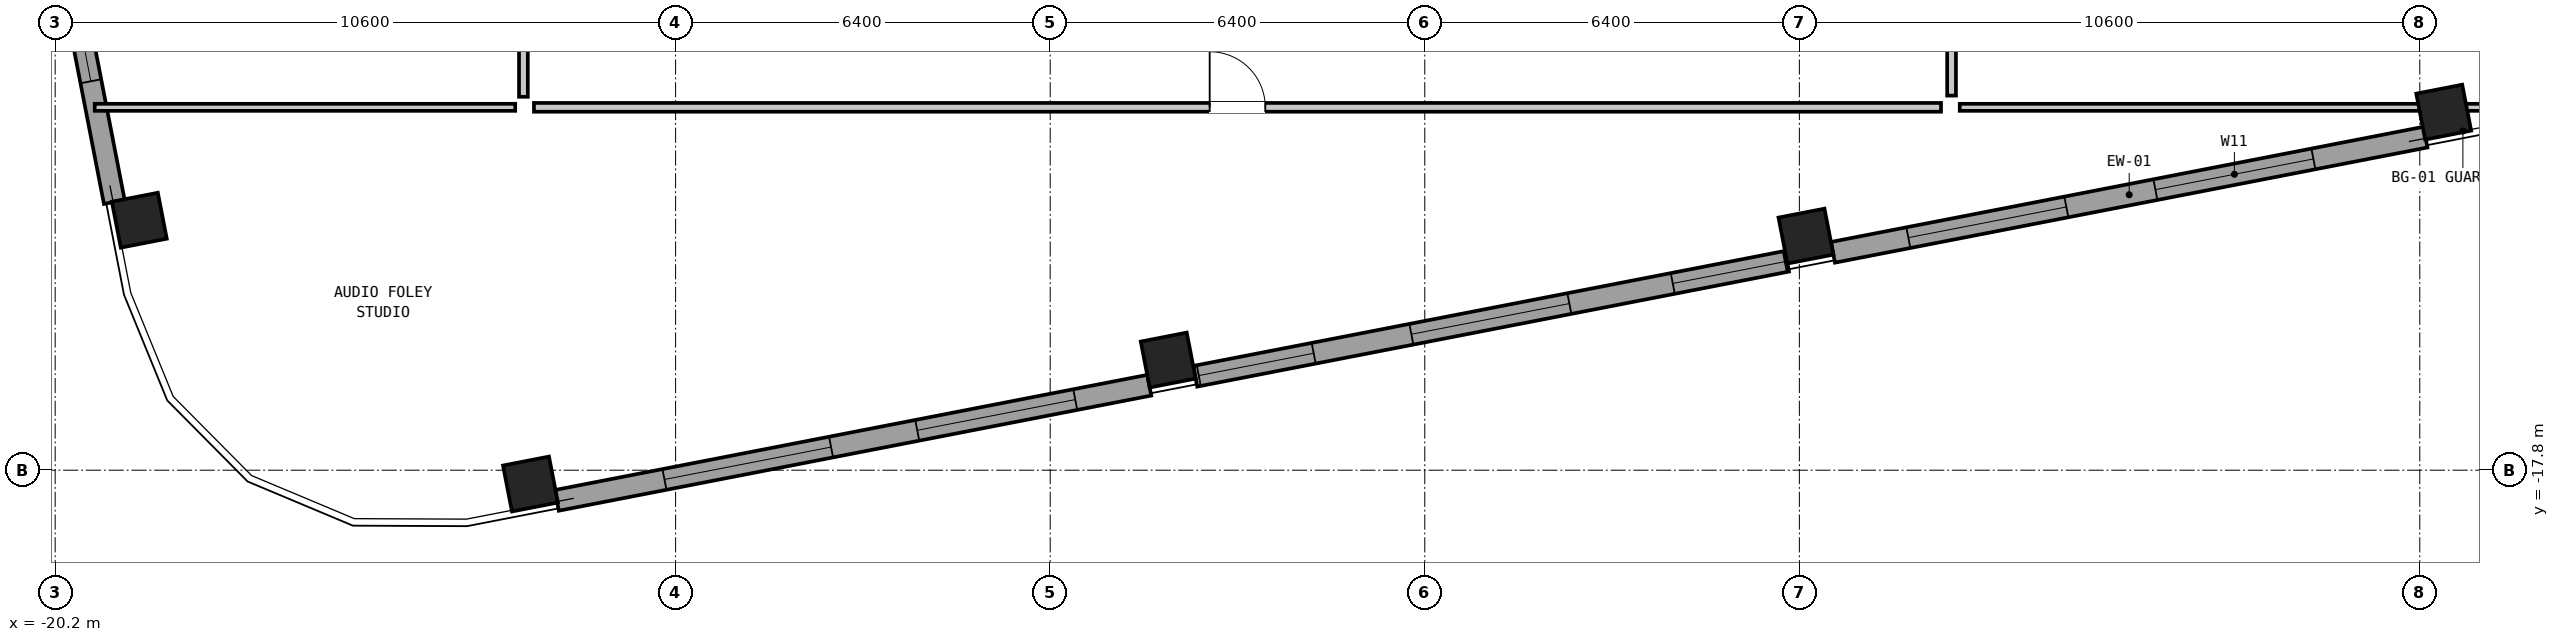
"""IFC4 building model, lengths in metres.
Left out: names, types, materials, properties, quantities, classifications, styles, units other than length and angle.
Written with IfcOpenShell. Run it as: python <this file> out.ifc"""

import sys

from ifc_helpers import new_model, si_unit, direction, frame, frame_2d, origin, origin_2d, place, context, subcontext, project, spatial, rectangle, hollow_rectangle, extrude, element, fill, save


model = new_model("IFC4")
c1 = context("Model", 3, precision=1e-05, world=origin(), true_north=direction((0.0, 1.0)))
c2 = subcontext(c1, "Body", "Model", "MODEL_VIEW")
j1 = project(units=[si_unit("LENGTHUNIT", "METRE"), si_unit("PLANEANGLEUNIT", "RADIAN")], contexts=[c1])
p1 = place(None, origin())
s1 = spatial("IfcSite", under=j1, at=p1, CompositionType="ELEMENT")
p2 = place(p1, origin())
s2 = spatial("IfcBuilding", under=s1, at=p2, CompositionType="ELEMENT")
p3 = place(p2, frame((0.0, 0.0, 115.85)))
s3 = spatial("IfcBuildingStorey", under=s2, at=p3, CompositionType="ELEMENT", Elevation=115.85)
for number, where, z_axis, x_axis in (
    (1, (-12.08, -18.036, 0.0), (0.0, 0.0, 1.0), (0.982, 0.191, 0.0)),
    (2, (-1.183, -15.918, 0.0), (0.0, 0.0, 1.0), (0.982, 0.191, 0.0)),
    (3, (9.713, -13.8, 0.0), (0.0, 0.0, 1.0), (0.982, 0.191, 0.0)),
    (4, (20.609, -11.682, 0.0), (0.0, 0.0, 1.0), (0.982, 0.191, 0.0)),
    (5, (-18.762, -13.529, 0.0), (0.0, 0.0, 1.0), (-0.191, 0.982, 0.0)),
):
    element("IfcColumn", number, at=place(p3, frame(where, z_axis=z_axis, x_axis=x_axis)), inside=s3, PredefinedType="COLUMN", context=c2, shape_type="SweptSolid", body=[
        extrude(hollow_rectangle(XDim=0.8, YDim=0.8, WallThickness=0.05, at=origin_2d()), origin(), (0.0, 0.0, 1.0), 3.05),
    ])
p4 = place(p3, frame((20.296, -12.11, 0.0), z_axis=(0.0, 0.0, 1.0), x_axis=(-0.981628941133, -0.190799952646, 0.0)))
e6 = element("IfcWall", 6, at=p4, inside=s3, PredefinedType="SOLIDWALL", context=c2, shape_type="SweptSolid", body=[
    extrude(rectangle(XDim=10.312, YDim=0.36, at=frame_2d((5.156, 0.0))), origin(), (0.0, 0.0, 1.0), 2.067),
])
p5 = place(p4, frame((1.95, 0.0, 0.2)))
e7 = element("IfcOpeningElement", 7, at=p5, cuts=e6, PredefinedType="OPENING", context=c2, shape_type="SweptSolid", body=[
    extrude(rectangle(XDim=2.75, YDim=0.95, at=frame_2d((1.375, 0.475))), frame((0.0, 0.192, 0.0), z_axis=(0.0, -1.0, 0.0), x_axis=(1.0, 0.0, 0.0)), (0.0, 0.0, 1.0), 0.384),
])
p6 = place(p4, frame((6.25, 0.0, 0.95)))
e8 = element("IfcOpeningElement", 8, at=p6, cuts=e6, PredefinedType="OPENING", context=c2, shape_type="SweptSolid", body=[
    extrude(rectangle(XDim=2.75, YDim=0.95, at=frame_2d((1.375, 0.475))), frame((0.0, 0.192, 0.0), z_axis=(0.0, -1.0, 0.0), x_axis=(1.0, 0.0, 0.0)), (0.0, 0.0, 1.0), 0.384),
])
p7 = place(p3, frame((9.389, -14.23, 0.0), z_axis=(0.0, 0.0, 1.0), x_axis=(-0.981627477005, -0.190807485147, 0.0)))
e9 = element("IfcWall", 9, at=p7, inside=s3, PredefinedType="SOLIDWALL", context=c2, shape_type="SweptSolid", body=[
    extrude(rectangle(XDim=10.3, YDim=0.36, at=frame_2d((5.15, 0.0))), origin(), (0.0, 0.0, 1.0), 2.067),
])
p8 = place(p7, frame((0.038, 0.0, 0.2)))
e10 = element("IfcOpeningElement", 10, at=p8, cuts=e9, PredefinedType="OPENING", context=c2, shape_type="SweptSolid", body=[
    extrude(rectangle(XDim=1.95, YDim=1.1, at=frame_2d((0.975, 0.55))), frame((0.0, 0.192, 0.0), z_axis=(0.0, -1.0, 0.0), x_axis=(1.0, 0.0, 0.0)), (0.0, 0.0, 1.0), 0.384),
])
p9 = place(p7, frame((3.788, 0.0, 0.95)))
e11 = element("IfcOpeningElement", 11, at=p9, cuts=e9, PredefinedType="OPENING", context=c2, shape_type="SweptSolid", body=[
    extrude(rectangle(XDim=2.75, YDim=0.95, at=frame_2d((1.375, 0.475))), frame((0.0, 0.192, 0.0), z_axis=(0.0, -1.0, 0.0), x_axis=(1.0, 0.0, 0.0)), (0.0, 0.0, 1.0), 0.384),
])
p10 = place(p7, frame((8.238, 0.0, 0.2)))
e12 = element("IfcOpeningElement", 12, at=p10, cuts=e9, PredefinedType="OPENING", context=c2, shape_type="SweptSolid", body=[
    extrude(rectangle(XDim=2.0, YDim=1.05, at=frame_2d((1.0, 0.525))), frame((0.0, 0.192, 0.0), z_axis=(0.0, -1.0, 0.0), x_axis=(1.0, 0.0, 0.0)), (0.0, 0.0, 1.0), 0.384),
])
p11 = place(p3, frame((-1.507, -16.348, 0.0), z_axis=(0.0, 0.0, 1.0), x_axis=(-0.981628941133, -0.190799952646, 0.0)))
e13 = element("IfcWall", 13, at=p11, inside=s3, PredefinedType="SOLIDWALL", context=c2, shape_type="SweptSolid", body=[
    extrude(rectangle(XDim=10.312, YDim=0.36, at=frame_2d((5.156, 0.0))), origin(), (0.0, 0.0, 1.0), 2.067),
])
p12 = place(p11, frame((1.288, 0.0, 0.95)))
e14 = element("IfcOpeningElement", 14, at=p12, cuts=e13, PredefinedType="OPENING", context=c2, shape_type="SweptSolid", body=[
    extrude(rectangle(XDim=2.75, YDim=0.95, at=frame_2d((1.375, 0.475))), frame((0.0, 0.192, 0.0), z_axis=(0.0, -1.0, 0.0), x_axis=(1.0, 0.0, 0.0)), (0.0, 0.0, 1.0), 0.384),
])
p13 = place(p11, frame((5.538, 0.0, 0.2)))
e15 = element("IfcOpeningElement", 15, at=p13, cuts=e13, PredefinedType="OPENING", context=c2, shape_type="SweptSolid", body=[
    extrude(rectangle(XDim=2.9, YDim=0.9, at=frame_2d((1.45, 0.45))), frame((0.0, 0.192, 0.0), z_axis=(0.0, -1.0, 0.0), x_axis=(1.0, 0.0, 0.0)), (0.0, 0.0, 1.0), 0.384),
])
p14 = place(p3, frame((-19.19, -13.217, 0.0), z_axis=(0.0, 0.0, 1.0), x_axis=(-0.190822765986, 0.981624506612, 0.0)))
e16 = element("IfcWall", 16, at=p14, inside=s3, PredefinedType="SOLIDWALL", context=c2, shape_type="SweptSolid", body=[
    extrude(rectangle(XDim=10.312, YDim=0.36, at=frame_2d((5.156, 0.0))), origin(), (0.0, 0.0, 1.0), 2.067),
])
p15 = place(p14, frame((2.1, 0.0, 0.2)))
e17 = element("IfcOpeningElement", 17, at=p15, cuts=e16, PredefinedType="OPENING", context=c2, shape_type="SweptSolid", body=[
    extrude(rectangle(XDim=2.45, YDim=1.1, at=frame_2d((1.225, 0.55))), frame((0.0, 0.192, 0.0), z_axis=(0.0, -1.0, 0.0), x_axis=(1.0, 0.0, 0.0)), (0.0, 0.0, 1.0), 0.384),
])
p16 = place(p14, frame((6.15, 0.0, 0.95)))
e18 = element("IfcOpeningElement", 18, at=p16, cuts=e16, PredefinedType="OPENING", context=c2, shape_type="SweptSolid", body=[
    extrude(rectangle(XDim=2.95, YDim=0.95, at=frame_2d((1.475, 0.475))), frame((0.0, 0.192, 0.0), z_axis=(0.0, -1.0, 0.0), x_axis=(1.0, 0.0, 0.0)), (0.0, 0.0, 1.0), 0.384),
])
p17 = place(p3, frame((-19.524, -11.6, 0.0), z_axis=(0.0, 0.0, 1.0), x_axis=(1.0, 0.0, 0.0)))
e19 = element("IfcWall", 19, at=p17, inside=s3, PredefinedType="PARTITIONING", context=c2, shape_type="SweptSolid", body=[
    extrude(rectangle(XDim=7.184, YDim=0.12, at=frame_2d((3.592, 0.0))), origin(), (0.0, 0.0, 1.0), 2.347),
])
p18 = place(p3, frame((12.34, -11.6, 0.0), z_axis=(0.0, 0.0, 1.0), x_axis=(1.0, 0.0, 0.0)))
e20 = element("IfcWall", 20, at=p18, inside=s3, PredefinedType="PARTITIONING", context=c2, shape_type="SweptSolid", body=[
    extrude(rectangle(XDim=10.066, YDim=0.12, at=frame_2d((5.033, 0.0))), origin(), (0.0, 0.0, 1.0), 2.127),
])
p19 = place(p3, frame((-12.02, -11.6, 0.0), z_axis=(0.0, 0.0, 1.0), x_axis=(1.0, 0.0, 0.0)))
e21 = element("IfcWall", 21, at=p19, inside=s3, PredefinedType="PARTITIONING", context=c2, shape_type="SweptSolid", body=[
    extrude(rectangle(XDim=24.04, YDim=0.15, at=frame_2d((12.02, 0.0))), origin(), (0.0, 0.0, 1.0), 2.347),
])
p20 = place(p19, frame((11.545, 0.0, 0.0)))
e22 = element("IfcOpeningElement", 22, at=p20, cuts=e21, PredefinedType="OPENING", context=c2, shape_type="SweptSolid", body=[
    extrude(rectangle(XDim=0.95, YDim=2.1, at=frame_2d((0.475, 1.05))), frame((0.0, 0.087, 0.0), z_axis=(0.0, -1.0, 0.0), x_axis=(1.0, 0.0, 0.0)), (0.0, 0.0, 1.0), 0.174),
])
p21 = place(p3, frame((-12.2, -11.42, 0.0), z_axis=(0.0, 0.0, 1.0), x_axis=(0.0, 1.0, 0.0)))
e23 = element("IfcWall", 23, at=p21, inside=s3, PredefinedType="PARTITIONING", context=c2, shape_type="SweptSolid", body=[
    extrude(rectangle(XDim=24.04, YDim=0.15, at=frame_2d((12.02, 0.0))), origin(), (0.0, 0.0, 1.0), 2.83),
])
p22 = place(p21, frame((11.545, 0.0, 0.0)))
e24 = element("IfcOpeningElement", 24, at=p22, cuts=e23, PredefinedType="OPENING", context=c2, shape_type="SweptSolid", body=[
    extrude(rectangle(XDim=0.95, YDim=2.1, at=frame_2d((0.475, 1.05))), frame((0.0, 0.087, 0.0), z_axis=(0.0, -1.0, 0.0), x_axis=(1.0, 0.0, 0.0)), (0.0, 0.0, 1.0), 0.174),
])
p23 = place(p3, frame((12.2, -11.4, 0.0), z_axis=(0.0, 0.0, 1.0), x_axis=(0.0, 1.0, 0.0)))
e25 = element("IfcWall", 25, at=p23, inside=s3, PredefinedType="PARTITIONING", context=c2, shape_type="SweptSolid", body=[
    extrude(rectangle(XDim=8.84, YDim=0.15, at=frame_2d((4.42, 0.0))), origin(), (0.0, 0.0, 1.0), 2.83),
])
p24 = place(p23, frame((3.945, 0.0, 0.0)))
e26 = element("IfcOpeningElement", 26, at=p24, cuts=e25, PredefinedType="OPENING", context=c2, shape_type="SweptSolid", body=[
    extrude(rectangle(XDim=0.95, YDim=2.1, at=frame_2d((0.475, 1.05))), frame((0.0, 0.087, 0.0), z_axis=(0.0, -1.0, 0.0), x_axis=(1.0, 0.0, 0.0)), (0.0, 0.0, 1.0), 0.174),
])
p25 = place(p5, origin())
e27 = element("IfcWindow", 27, at=p25, inside=s3, PartitioningType="SINGLE_PANEL", PredefinedType="WINDOW", context=c2, shape_type="SweptSolid", body=[
    extrude(rectangle(XDim=2.75, YDim=0.95, at=frame_2d((1.375, 0.475))), frame((0.0, 0.03, 0.0), z_axis=(0.0, -1.0, 0.0), x_axis=(1.0, 0.0, 0.0)), (0.0, 0.0, 1.0), 0.06),
])
fill(e7, e27)
p26 = place(p6, origin())
e28 = element("IfcWindow", 28, at=p26, inside=s3, PartitioningType="SINGLE_PANEL", PredefinedType="WINDOW", context=c2, shape_type="SweptSolid", body=[
    extrude(rectangle(XDim=2.75, YDim=0.95, at=frame_2d((1.375, 0.475))), frame((0.0, 0.03, 0.0), z_axis=(0.0, -1.0, 0.0), x_axis=(1.0, 0.0, 0.0)), (0.0, 0.0, 1.0), 0.06),
])
fill(e8, e28)
p27 = place(p8, origin())
e29 = element("IfcWindow", 29, at=p27, inside=s3, PartitioningType="SINGLE_PANEL", PredefinedType="WINDOW", context=c2, shape_type="SweptSolid", body=[
    extrude(rectangle(XDim=1.95, YDim=1.1, at=frame_2d((0.975, 0.55))), frame((0.0, 0.03, 0.0), z_axis=(0.0, -1.0, 0.0), x_axis=(1.0, 0.0, 0.0)), (0.0, 0.0, 1.0), 0.06),
])
fill(e10, e29)
p28 = place(p9, origin())
e30 = element("IfcWindow", 30, at=p28, inside=s3, PartitioningType="SINGLE_PANEL", PredefinedType="WINDOW", context=c2, shape_type="SweptSolid", body=[
    extrude(rectangle(XDim=2.75, YDim=0.95, at=frame_2d((1.375, 0.475))), frame((0.0, 0.03, 0.0), z_axis=(0.0, -1.0, 0.0), x_axis=(1.0, 0.0, 0.0)), (0.0, 0.0, 1.0), 0.06),
])
fill(e11, e30)
p29 = place(p10, origin())
e31 = element("IfcWindow", 31, at=p29, inside=s3, PartitioningType="SINGLE_PANEL", PredefinedType="WINDOW", context=c2, shape_type="SweptSolid", body=[
    extrude(rectangle(XDim=2.0, YDim=1.05, at=frame_2d((1.0, 0.525))), frame((0.0, 0.03, 0.0), z_axis=(0.0, -1.0, 0.0), x_axis=(1.0, 0.0, 0.0)), (0.0, 0.0, 1.0), 0.06),
])
fill(e12, e31)
p30 = place(p12, origin())
e32 = element("IfcWindow", 32, at=p30, inside=s3, PartitioningType="SINGLE_PANEL", PredefinedType="WINDOW", context=c2, shape_type="SweptSolid", body=[
    extrude(rectangle(XDim=2.75, YDim=0.95, at=frame_2d((1.375, 0.475))), frame((0.0, 0.03, 0.0), z_axis=(0.0, -1.0, 0.0), x_axis=(1.0, 0.0, 0.0)), (0.0, 0.0, 1.0), 0.06),
])
fill(e14, e32)
p31 = place(p13, origin())
e33 = element("IfcWindow", 33, at=p31, inside=s3, PartitioningType="SINGLE_PANEL", PredefinedType="WINDOW", context=c2, shape_type="SweptSolid", body=[
    extrude(rectangle(XDim=2.9, YDim=0.9, at=frame_2d((1.45, 0.45))), frame((0.0, 0.03, 0.0), z_axis=(0.0, -1.0, 0.0), x_axis=(1.0, 0.0, 0.0)), (0.0, 0.0, 1.0), 0.06),
])
fill(e15, e33)
p32 = place(p15, origin())
e34 = element("IfcWindow", 34, at=p32, inside=s3, PartitioningType="SINGLE_PANEL", PredefinedType="WINDOW", context=c2, shape_type="SweptSolid", body=[
    extrude(rectangle(XDim=2.45, YDim=1.1, at=frame_2d((1.225, 0.55))), frame((0.0, 0.03, 0.0), z_axis=(0.0, -1.0, 0.0), x_axis=(1.0, 0.0, 0.0)), (0.0, 0.0, 1.0), 0.06),
])
fill(e17, e34)
p33 = place(p20, origin())
e35 = element("IfcDoor", 35, at=p33, inside=s3, OperationType="SINGLE_SWING_LEFT", PredefinedType="DOOR", context=c2, shape_type="SweptSolid", body=[
    extrude(rectangle(XDim=0.95, YDim=2.1, at=frame_2d((0.475, 1.05))), frame((0.0, 0.025, 0.0), z_axis=(0.0, -1.0, 0.0), x_axis=(1.0, 0.0, 0.0)), (0.0, 0.0, 1.0), 0.05),
])
fill(e22, e35)
save(model, sys.argv[1])
